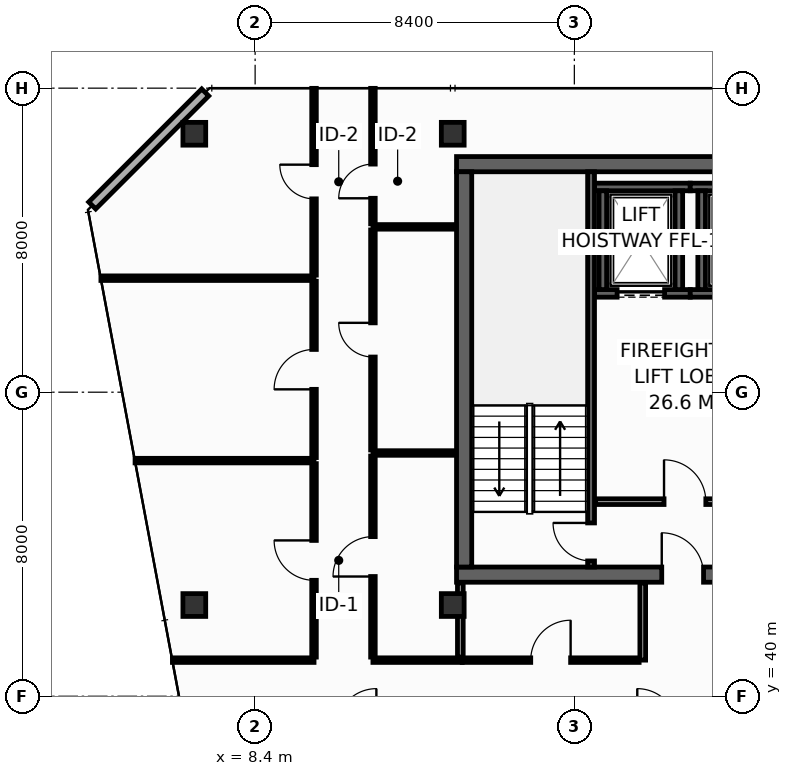
"""IFC4 building model, lengths in metres.
Left out: names, types, materials, properties, quantities, classifications, styles, units other than length and angle.
Written with IfcOpenShell. Run it as: python <this file> out.ifc"""

import sys

from ifc_helpers import new_model, si_unit, direction, frame, frame_2d, origin, origin_2d, place, context, subcontext, project, spatial, rectangle, hollow_rectangle, extrude, element, fill, save


model = new_model("IFC4")
c1 = context("Model", 3, precision=1e-05, world=origin(), true_north=direction((0.0, 1.0)))
c2 = subcontext(c1, "Body", "Model", "MODEL_VIEW")
j1 = project(units=[si_unit("LENGTHUNIT", "METRE"), si_unit("PLANEANGLEUNIT", "RADIAN")], contexts=[c1])
p1 = place(None, origin())
s1 = spatial("IfcSite", under=j1, at=p1, CompositionType="ELEMENT")
p2 = place(p1, origin())
s2 = spatial("IfcBuilding", under=s1, at=p2, CompositionType="ELEMENT")
p3 = place(p2, frame((0.0, 0.0, 280.0)))
s3 = spatial("IfcBuildingStorey", under=s2, at=p3, CompositionType="ELEMENT", Elevation=280.0)
p4 = place(p3, frame((13.7, 43.2, 0.0), z_axis=(0.0, 0.0, 1.0), x_axis=(1.0, 0.0, 0.0)))
e1 = element("IfcWall", 1, at=p4, inside=s3, PredefinedType="SHEAR", context=c2, shape_type="SweptSolid", body=[
    extrude(rectangle(XDim=32.5, YDim=0.4, at=frame_2d((16.25, 0.0))), origin(), (0.0, 0.0, 1.0), 3.55),
])
p5 = place(p4, frame((5.4, 0.0, 0.0)))
e2 = element("IfcOpeningElement", 2, at=p5, cuts=e1, PredefinedType="OPENING", context=c2, shape_type="SweptSolid", body=[
    extrude(rectangle(XDim=1.1, YDim=2.15, at=frame_2d((0.55, 1.075))), frame((0.0, 0.21, 0.0), z_axis=(0.0, -1.0, 0.0), x_axis=(1.0, 0.0, 0.0)), (0.0, 0.0, 1.0), 0.42),
])
p6 = place(p4, frame((25.6, 0.0, 0.0)))
e3 = element("IfcOpeningElement", 3, at=p6, cuts=e1, PredefinedType="OPENING", context=c2, shape_type="SweptSolid", body=[
    extrude(rectangle(XDim=1.1, YDim=2.15, at=frame_2d((0.55, 1.075))), frame((0.0, 0.21, 0.0), z_axis=(0.0, -1.0, 0.0), x_axis=(1.0, 0.0, 0.0)), (0.0, 0.0, 1.0), 0.42),
])
p7 = place(p3, frame((13.7, 54.0, 0.0), z_axis=(0.0, 0.0, 1.0), x_axis=(1.0, 0.0, 0.0)))
e4 = element("IfcWall", 4, at=p7, inside=s3, PredefinedType="SHEAR", context=c2, shape_type="SweptSolid", body=[
    extrude(rectangle(XDim=32.5, YDim=0.4, at=frame_2d((16.25, 0.0))), origin(), (0.0, 0.0, 1.0), 3.55),
])
p8 = place(p3, frame((13.9, 43.4, 0.0), z_axis=(0.0, 0.0, 1.0), x_axis=(0.0, 1.0, 0.0)))
e5 = element("IfcWall", 5, at=p8, inside=s3, PredefinedType="SHEAR", context=c2, shape_type="SweptSolid", body=[
    extrude(rectangle(XDim=10.4, YDim=0.4, at=frame_2d((5.2, 0.0))), origin(), (0.0, 0.0, 1.0), 3.55),
])
for number, where, z_axis, x_axis in (
    (6, (6.8, 54.8, 0.0), (0.0, 0.0, 1.0), (1.0, 0.0, 0.0)),
    (7, (13.6, 54.8, 0.0), (0.0, 0.0, 1.0), (1.0, 0.0, 0.0)),
    (8, (6.8, 42.4, 0.0), (0.0, 0.0, 1.0), (1.0, 0.0, 0.0)),
    (9, (13.6, 42.4, 0.0), (0.0, 0.0, 1.0), (1.0, 0.0, 0.0)),
):
    element("IfcColumn", number, at=place(p3, frame(where, z_axis=z_axis, x_axis=x_axis)), inside=s3, PredefinedType="COLUMN", context=c2, shape_type="SweptSolid", body=[
        extrude(hollow_rectangle(XDim=0.6, YDim=0.6, WallThickness=0.028, at=origin_2d()), origin(), (0.0, 0.0, 1.0), 3.8),
    ])
p9 = place(p3, frame((17.33, 50.6, 0.0), z_axis=(0.0, 0.0, 1.0), x_axis=(1.0, 0.0, 0.0)))
e10 = element("IfcWall", 10, at=p9, inside=s3, PredefinedType="SHEAR", context=c2, shape_type="SweptSolid", body=[
    extrude(rectangle(XDim=2.52, YDim=0.2, at=frame_2d((1.26, 0.0))), origin(), (0.0, 0.0, 1.0), 3.55),
])
p10 = place(p9, frame((0.595, 0.0, 0.0)))
e11 = element("IfcOpeningElement", 11, at=p10, cuts=e10, PredefinedType="OPENING", context=c2, shape_type="SweptSolid", body=[
    extrude(rectangle(XDim=1.25, YDim=2.3, at=frame_2d((0.625, 1.15))), frame((0.0, 0.11, 0.0), z_axis=(0.0, -1.0, 0.0), x_axis=(1.0, 0.0, 0.0)), (0.0, 0.0, 1.0), 0.22),
])
p11 = place(p3, frame((17.33, 53.4, 0.0), z_axis=(0.0, 0.0, 1.0), x_axis=(1.0, 0.0, 0.0)))
e12 = element("IfcWall", 12, at=p11, inside=s3, PredefinedType="SHEAR", context=c2, shape_type="SweptSolid", body=[
    extrude(rectangle(XDim=2.52, YDim=0.2, at=frame_2d((1.26, 0.0))), origin(), (0.0, 0.0, 1.0), 3.55),
])
for number, where, z_axis, x_axis in (
    (13, (17.55, 50.7, 0.0), (0.0, 0.0, 1.0), (0.0, 1.0, 0.0)),
    (14, (19.55, 50.7, 0.0), (0.0, 0.0, 1.0), (0.0, 1.0, 0.0)),
):
    element("IfcWall", number, at=place(p3, frame(where, z_axis=z_axis, x_axis=x_axis)), inside=s3, PredefinedType="SHEAR", context=c2, shape_type="SweptSolid", body=[
        extrude(rectangle(XDim=2.6, YDim=0.2, at=frame_2d((1.3, 0.0))), origin(), (0.0, 0.0, 1.0), 3.55),
    ])
p12 = place(p3, frame((19.85, 50.6, 0.0), z_axis=(0.0, 0.0, 1.0), x_axis=(1.0, 0.0, 0.0)))
e15 = element("IfcWall", 15, at=p12, inside=s3, PredefinedType="SHEAR", context=c2, shape_type="SweptSolid", body=[
    extrude(rectangle(XDim=2.65, YDim=0.2, at=frame_2d((1.325, 0.0))), origin(), (0.0, 0.0, 1.0), 3.55),
])
p13 = place(p12, frame((0.675, 0.0, 0.0)))
e16 = element("IfcOpeningElement", 16, at=p13, cuts=e15, PredefinedType="OPENING", context=c2, shape_type="SweptSolid", body=[
    extrude(rectangle(XDim=1.25, YDim=2.3, at=frame_2d((0.625, 1.15))), frame((0.0, 0.11, 0.0), z_axis=(0.0, -1.0, 0.0), x_axis=(1.0, 0.0, 0.0)), (0.0, 0.0, 1.0), 0.22),
])
p14 = place(p3, frame((19.85, 53.4, 0.0), z_axis=(0.0, 0.0, 1.0), x_axis=(1.0, 0.0, 0.0)))
e17 = element("IfcWall", 17, at=p14, inside=s3, PredefinedType="SHEAR", context=c2, shape_type="SweptSolid", body=[
    extrude(rectangle(XDim=2.65, YDim=0.2, at=frame_2d((1.325, 0.0))), origin(), (0.0, 0.0, 1.0), 3.55),
])
p15 = place(p3, frame((20.15, 50.7, 0.0), z_axis=(0.0, 0.0, 1.0), x_axis=(0.0, 1.0, 0.0)))
e18 = element("IfcWall", 18, at=p15, inside=s3, PredefinedType="SHEAR", context=c2, shape_type="SweptSolid", body=[
    extrude(rectangle(XDim=2.6, YDim=0.2, at=frame_2d((1.3, 0.0))), origin(), (0.0, 0.0, 1.0), 3.55),
])
p16 = place(p3, frame((17.24, 43.4, 0.0), z_axis=(0.0, 0.0, 1.0), x_axis=(0.0, 1.0, 0.0)))
e19 = element("IfcWall", 19, at=p16, inside=s3, PredefinedType="SHEAR", context=c2, shape_type="SweptSolid", body=[
    extrude(rectangle(XDim=10.4, YDim=0.18, at=frame_2d((5.2, 0.0))), origin(), (0.0, 0.0, 1.0), 3.55),
])
p17 = place(p16, frame((0.16, 0.0, 0.0)))
e20 = element("IfcOpeningElement", 20, at=p17, cuts=e19, PredefinedType="OPENING", context=c2, shape_type="SweptSolid", body=[
    extrude(rectangle(XDim=1.0, YDim=2.15, at=frame_2d((0.5, 1.075))), frame((0.0, 0.1, 0.0), z_axis=(0.0, -1.0, 0.0), x_axis=(1.0, 0.0, 0.0)), (0.0, 0.0, 1.0), 0.2),
])
p18 = place(p3, frame((17.36, 45.12, 0.0), z_axis=(0.0, 0.0, 1.0), x_axis=(1.0, 0.0, 0.0)))
e21 = element("IfcWall", 21, at=p18, inside=s3, PredefinedType="PARTITIONING", context=c2, shape_type="SweptSolid", body=[
    extrude(rectangle(XDim=5.14, YDim=0.15, at=frame_2d((2.57, 0.0))), origin(), (0.0, 0.0, 1.0), 3.55),
])
p19 = place(p18, frame((1.8, 0.0, 0.0)))
e22 = element("IfcOpeningElement", 22, at=p19, cuts=e21, PredefinedType="OPENING", context=c2, shape_type="SweptSolid", body=[
    extrude(rectangle(XDim=1.1, YDim=2.15, at=frame_2d((0.55, 1.075))), frame((0.0, 0.085, 0.0), z_axis=(0.0, -1.0, 0.0), x_axis=(1.0, 0.0, 0.0)), (0.0, 0.0, 1.0), 0.17),
])
p20 = place(p3, frame((7.087, 55.887, 0.0), z_axis=(0.0, 0.0, 1.0), x_axis=(-0.707106781187, -0.707106781187, 0.0)))
e23 = element("IfcWall", 23, at=p20, inside=s3, PredefinedType="STANDARD", context=c2, shape_type="SweptSolid", body=[
    extrude(rectangle(XDim=4.206, YDim=0.26, at=frame_2d((2.103, 0.0))), origin(), (0.0, 0.0, 1.0), 3.55),
])
p21 = place(p3, frame((6.224, 40.95, 0.0), z_axis=(0.0, 0.0, 1.0), x_axis=(1.0, 0.0, 0.0)))
e24 = element("IfcWall", 24, at=p21, inside=s3, PredefinedType="PARTITIONING", context=c2, shape_type="SweptSolid", body=[
    extrude(rectangle(XDim=3.726, YDim=0.12, at=frame_2d((1.863, 0.0))), origin(), (0.0, 0.0, 1.0), 3.085),
])
p22 = place(p3, frame((11.5, 40.95, 0.0), z_axis=(0.0, 0.0, 1.0), x_axis=(1.0, 0.0, 0.0)))
e25 = element("IfcWall", 25, at=p22, inside=s3, PredefinedType="PARTITIONING", context=c2, shape_type="SweptSolid", body=[
    extrude(rectangle(XDim=2.35, YDim=0.12, at=frame_2d((1.175, 0.0))), origin(), (0.0, 0.0, 1.0), 3.55),
])
p23 = place(p3, frame((11.5, 52.35, 0.0), z_axis=(0.0, 0.0, 1.0), x_axis=(1.0, 0.0, 0.0)))
e26 = element("IfcWall", 26, at=p23, inside=s3, PredefinedType="PARTITIONING", context=c2, shape_type="SweptSolid", body=[
    extrude(rectangle(XDim=2.18, YDim=0.12, at=frame_2d((1.09, 0.0))), origin(), (0.0, 0.0, 1.0), 3.55),
])
p24 = place(p3, frame((11.5, 52.43, 0.0), z_axis=(0.0, 0.0, 1.0), x_axis=(0.0, 1.0, 0.0)))
e27 = element("IfcWall", 27, at=p24, inside=s3, PredefinedType="PARTITIONING", context=c2, shape_type="SweptSolid", body=[
    extrude(rectangle(XDim=3.565, YDim=0.12, at=frame_2d((1.783, 0.0))), origin(), (0.0, 0.0, 1.0), 2.935),
])
p25 = place(p24, frame((0.672, 0.0, 0.0)))
e28 = element("IfcOpeningElement", 28, at=p25, cuts=e27, PredefinedType="OPENING", context=c2, shape_type="SweptSolid", body=[
    extrude(rectangle(XDim=0.9, YDim=2.1, at=frame_2d((0.45, 1.05))), frame((0.0, 0.07, 0.0), z_axis=(0.0, -1.0, 0.0), x_axis=(1.0, 0.0, 0.0)), (0.0, 0.0, 1.0), 0.14),
])
p26 = place(p3, frame((5.241, 46.2, 0.0), z_axis=(0.0, 0.0, 1.0), x_axis=(1.0, 0.0, 0.0)))
e29 = element("IfcWall", 29, at=p26, inside=s3, PredefinedType="PARTITIONING", context=c2, shape_type="SweptSolid", body=[
    extrude(rectangle(XDim=4.709, YDim=0.12, at=frame_2d((2.354, 0.0))), origin(), (0.0, 0.0, 1.0), 2.947),
])
p27 = place(p3, frame((4.342, 51.0, 0.0), z_axis=(0.0, 0.0, 1.0), x_axis=(1.0, 0.0, 0.0)))
e30 = element("IfcWall", 30, at=p27, inside=s3, PredefinedType="PARTITIONING", context=c2, shape_type="SweptSolid", body=[
    extrude(rectangle(XDim=5.608, YDim=0.12, at=frame_2d((2.804, 0.0))), origin(), (0.0, 0.0, 1.0), 2.947),
])
p28 = place(p3, frame((9.95, 41.03, 0.0), z_axis=(0.0, 0.0, 1.0), x_axis=(0.0, 1.0, 0.0)))
e31 = element("IfcWall", 31, at=p28, inside=s3, PredefinedType="PARTITIONING", context=c2, shape_type="SweptSolid", body=[
    extrude(rectangle(XDim=5.09, YDim=0.12, at=frame_2d((2.545, 0.0))), origin(), (0.0, 0.0, 1.0), 2.947),
])
p29 = place(p28, frame((2.02, 0.0, 0.0)))
e32 = element("IfcOpeningElement", 32, at=p29, cuts=e31, PredefinedType="OPENING", context=c2, shape_type="SweptSolid", body=[
    extrude(rectangle(XDim=1.05, YDim=2.15, at=frame_2d((0.525, 1.075))), frame((0.0, 0.07, 0.0), z_axis=(0.0, -1.0, 0.0), x_axis=(1.0, 0.0, 0.0)), (0.0, 0.0, 1.0), 0.14),
])
p30 = place(p3, frame((9.95, 46.28, 0.0), z_axis=(0.0, 0.0, 1.0), x_axis=(0.0, 1.0, 0.0)))
e33 = element("IfcWall", 33, at=p30, inside=s3, PredefinedType="PARTITIONING", context=c2, shape_type="SweptSolid", body=[
    extrude(rectangle(XDim=4.64, YDim=0.12, at=frame_2d((2.32, 0.0))), origin(), (0.0, 0.0, 1.0), 3.55),
])
p31 = place(p30, frame((1.795, 0.0, 0.0)))
e34 = element("IfcOpeningElement", 34, at=p31, cuts=e33, PredefinedType="OPENING", context=c2, shape_type="SweptSolid", body=[
    extrude(rectangle(XDim=1.05, YDim=2.15, at=frame_2d((0.525, 1.075))), frame((0.0, 0.07, 0.0), z_axis=(0.0, -1.0, 0.0), x_axis=(1.0, 0.0, 0.0)), (0.0, 0.0, 1.0), 0.14),
])
p32 = place(p3, frame((9.95, 51.08, 0.0), z_axis=(0.0, 0.0, 1.0), x_axis=(0.0, 1.0, 0.0)))
e35 = element("IfcWall", 35, at=p32, inside=s3, PredefinedType="PARTITIONING", context=c2, shape_type="SweptSolid", body=[
    extrude(rectangle(XDim=4.915, YDim=0.12, at=frame_2d((2.458, 0.0))), origin(), (0.0, 0.0, 1.0), 2.935),
])
p33 = place(p32, frame((2.007, 0.0, 0.0)))
e36 = element("IfcOpeningElement", 36, at=p33, cuts=e35, PredefinedType="OPENING", context=c2, shape_type="SweptSolid", body=[
    extrude(rectangle(XDim=0.9, YDim=2.1, at=frame_2d((0.45, 1.05))), frame((0.0, 0.07, 0.0), z_axis=(0.0, -1.0, 0.0), x_axis=(1.0, 0.0, 0.0)), (0.0, 0.0, 1.0), 0.14),
])
p34 = place(p3, frame((11.5, 46.4, 0.0), z_axis=(0.0, 0.0, 1.0), x_axis=(1.0, 0.0, 0.0)))
e37 = element("IfcWall", 37, at=p34, inside=s3, PredefinedType="PARTITIONING", context=c2, shape_type="SweptSolid", body=[
    extrude(rectangle(XDim=2.18, YDim=0.12, at=frame_2d((1.09, 0.0))), origin(), (0.0, 0.0, 1.0), 3.55),
])
p35 = place(p3, frame((11.5, 41.03, 0.0), z_axis=(0.0, 0.0, 1.0), x_axis=(0.0, 1.0, 0.0)))
e38 = element("IfcWall", 38, at=p35, inside=s3, PredefinedType="PARTITIONING", context=c2, shape_type="SweptSolid", body=[
    extrude(rectangle(XDim=5.29, YDim=0.12, at=frame_2d((2.645, 0.0))), origin(), (0.0, 0.0, 1.0), 2.947),
])
p36 = place(p35, frame((2.12, 0.0, 0.0)))
e39 = element("IfcOpeningElement", 39, at=p36, cuts=e38, PredefinedType="OPENING", context=c2, shape_type="SweptSolid", body=[
    extrude(rectangle(XDim=1.05, YDim=2.15, at=frame_2d((0.525, 1.075))), frame((0.0, 0.07, 0.0), z_axis=(0.0, -1.0, 0.0), x_axis=(1.0, 0.0, 0.0)), (0.0, 0.0, 1.0), 0.14),
])
p37 = place(p3, frame((11.5, 46.48, 0.0), z_axis=(0.0, 0.0, 1.0), x_axis=(0.0, 1.0, 0.0)))
e40 = element("IfcWall", 40, at=p37, inside=s3, PredefinedType="PARTITIONING", context=c2, shape_type="SweptSolid", body=[
    extrude(rectangle(XDim=5.79, YDim=0.12, at=frame_2d((2.895, 0.0))), origin(), (0.0, 0.0, 1.0), 3.55),
])
p38 = place(p37, frame((2.445, 0.0, 0.0)))
e41 = element("IfcOpeningElement", 41, at=p38, cuts=e40, PredefinedType="OPENING", context=c2, shape_type="SweptSolid", body=[
    extrude(rectangle(XDim=0.9, YDim=2.1, at=frame_2d((0.45, 1.05))), frame((0.0, 0.07, 0.0), z_axis=(0.0, -1.0, 0.0), x_axis=(1.0, 0.0, 0.0)), (0.0, 0.0, 1.0), 0.14),
])
p39 = place(p3, frame((13.8, 41.03, 0.0), z_axis=(0.0, 0.0, 1.0), x_axis=(0.0, 1.0, 0.0)))
e42 = element("IfcWall", 42, at=p39, inside=s3, PredefinedType="PARTITIONING", context=c2, shape_type="SweptSolid", body=[
    extrude(rectangle(XDim=1.95, YDim=0.15, at=frame_2d((0.975, 0.0))), origin(), (0.0, 0.0, 1.0), 3.55),
])
p40 = place(p3, frame((18.6, 40.95, 0.0), z_axis=(0.0, 0.0, 1.0), x_axis=(0.0, 1.0, 0.0)))
e43 = element("IfcWall", 43, at=p40, inside=s3, PredefinedType="PARTITIONING", context=c2, shape_type="SweptSolid", body=[
    extrude(rectangle(XDim=2.03, YDim=0.15, at=frame_2d((1.015, 0.0))), origin(), (0.0, 0.0, 1.0), 3.55),
])
p41 = place(p3, frame((13.85, 40.95, 0.0), z_axis=(0.0, 0.0, 1.0), x_axis=(1.0, 0.0, 0.0)))
e44 = element("IfcWall", 44, at=p41, inside=s3, PredefinedType="PARTITIONING", context=c2, shape_type="SweptSolid", body=[
    extrude(rectangle(XDim=4.655, YDim=0.12, at=frame_2d((2.327, 0.0))), origin(), (0.0, 0.0, 1.0), 3.55),
])
p42 = place(p41, frame((1.802, 0.0, 0.0)))
e45 = element("IfcOpeningElement", 45, at=p42, cuts=e44, PredefinedType="OPENING", context=c2, shape_type="SweptSolid", body=[
    extrude(rectangle(XDim=1.05, YDim=2.15, at=frame_2d((0.525, 1.075))), frame((0.0, 0.07, 0.0), z_axis=(0.0, -1.0, 0.0), x_axis=(1.0, 0.0, 0.0)), (0.0, 0.0, 1.0), 0.14),
])
p43 = place(p10, origin())
e46 = element("IfcDoor", 46, at=p43, inside=s3, OperationType="SLIDING_TO_LEFT", PredefinedType="DOOR", context=c2, shape_type="SweptSolid", body=[
    extrude(rectangle(XDim=1.25, YDim=2.3, at=frame_2d((0.625, 1.15))), frame((0.0, 0.025, 0.0), z_axis=(0.0, -1.0, 0.0), x_axis=(1.0, 0.0, 0.0)), (0.0, 0.0, 1.0), 0.05),
])
fill(e11, e46)
p44 = place(p17, origin())
e47 = element("IfcDoor", 47, at=p44, inside=s3, OperationType="SINGLE_SWING_RIGHT", PredefinedType="DOOR", context=c2, shape_type="SweptSolid", body=[
    extrude(rectangle(XDim=1.0, YDim=2.15, at=frame_2d((0.5, 1.075))), frame((0.0, 0.025, 0.0), z_axis=(0.0, -1.0, 0.0), x_axis=(1.0, 0.0, 0.0)), (0.0, 0.0, 1.0), 0.05),
])
fill(e20, e47)
p45 = place(p19, origin())
e48 = element("IfcDoor", 48, at=p45, inside=s3, OperationType="SINGLE_SWING_LEFT", PredefinedType="DOOR", context=c2, shape_type="SweptSolid", body=[
    extrude(rectangle(XDim=1.1, YDim=2.15, at=frame_2d((0.55, 1.075))), frame((0.0, 0.025, 0.0), z_axis=(0.0, -1.0, 0.0), x_axis=(1.0, 0.0, 0.0)), (0.0, 0.0, 1.0), 0.05),
])
fill(e22, e48)
p46 = place(p5, origin())
e49 = element("IfcDoor", 49, at=p46, inside=s3, OperationType="SINGLE_SWING_LEFT", PredefinedType="DOOR", context=c2, shape_type="SweptSolid", body=[
    extrude(rectangle(XDim=1.1, YDim=2.15, at=frame_2d((0.55, 1.075))), frame((0.0, 0.025, 0.0), z_axis=(0.0, -1.0, 0.0), x_axis=(1.0, 0.0, 0.0)), (0.0, 0.0, 1.0), 0.05),
])
fill(e2, e49)
p47 = place(p25, origin())
e50 = element("IfcDoor", 50, at=p47, inside=s3, OperationType="SINGLE_SWING_LEFT", PredefinedType="DOOR", context=c2, shape_type="SweptSolid", body=[
    extrude(rectangle(XDim=0.9, YDim=2.1, at=frame_2d((0.45, 1.05))), frame((0.0, 0.025, 0.0), z_axis=(0.0, -1.0, 0.0), x_axis=(1.0, 0.0, 0.0)), (0.0, 0.0, 1.0), 0.05),
])
fill(e28, e50)
p48 = place(p29, origin())
e51 = element("IfcDoor", 51, at=p48, inside=s3, OperationType="SINGLE_SWING_RIGHT", PredefinedType="DOOR", context=c2, shape_type="SweptSolid", body=[
    extrude(rectangle(XDim=1.05, YDim=2.15, at=frame_2d((0.525, 1.075))), frame((0.0, 0.025, 0.0), z_axis=(0.0, -1.0, 0.0), x_axis=(1.0, 0.0, 0.0)), (0.0, 0.0, 1.0), 0.05),
])
fill(e32, e51)
p49 = place(p31, origin())
e52 = element("IfcDoor", 52, at=p49, inside=s3, OperationType="SINGLE_SWING_LEFT", PredefinedType="DOOR", context=c2, shape_type="SweptSolid", body=[
    extrude(rectangle(XDim=1.05, YDim=2.15, at=frame_2d((0.525, 1.075))), frame((0.0, 0.025, 0.0), z_axis=(0.0, -1.0, 0.0), x_axis=(1.0, 0.0, 0.0)), (0.0, 0.0, 1.0), 0.05),
])
fill(e34, e52)
p50 = place(p33, origin())
e53 = element("IfcDoor", 53, at=p50, inside=s3, OperationType="SINGLE_SWING_RIGHT", PredefinedType="DOOR", context=c2, shape_type="SweptSolid", body=[
    extrude(rectangle(XDim=0.9, YDim=2.1, at=frame_2d((0.45, 1.05))), frame((0.0, 0.025, 0.0), z_axis=(0.0, -1.0, 0.0), x_axis=(1.0, 0.0, 0.0)), (0.0, 0.0, 1.0), 0.05),
])
fill(e36, e53)
p51 = place(p36, origin())
e54 = element("IfcDoor", 54, at=p51, inside=s3, OperationType="SINGLE_SWING_LEFT", PredefinedType="DOOR", context=c2, shape_type="SweptSolid", body=[
    extrude(rectangle(XDim=1.05, YDim=2.15, at=frame_2d((0.525, 1.075))), frame((0.0, 0.025, 0.0), z_axis=(0.0, -1.0, 0.0), x_axis=(1.0, 0.0, 0.0)), (0.0, 0.0, 1.0), 0.05),
])
fill(e39, e54)
p52 = place(p38, origin())
e55 = element("IfcDoor", 55, at=p52, inside=s3, OperationType="SINGLE_SWING_RIGHT", PredefinedType="DOOR", context=c2, shape_type="SweptSolid", body=[
    extrude(rectangle(XDim=0.9, YDim=2.1, at=frame_2d((0.45, 1.05))), frame((0.0, 0.025, 0.0), z_axis=(0.0, -1.0, 0.0), x_axis=(1.0, 0.0, 0.0)), (0.0, 0.0, 1.0), 0.05),
])
fill(e41, e55)
p53 = place(p42, origin())
e56 = element("IfcDoor", 56, at=p53, inside=s3, OperationType="SINGLE_SWING_RIGHT", PredefinedType="DOOR", context=c2, shape_type="SweptSolid", body=[
    extrude(rectangle(XDim=1.05, YDim=2.15, at=frame_2d((0.525, 1.075))), frame((0.0, 0.025, 0.0), z_axis=(0.0, -1.0, 0.0), x_axis=(1.0, 0.0, 0.0)), (0.0, 0.0, 1.0), 0.05),
])
fill(e45, e56)
save(model, sys.argv[1])
